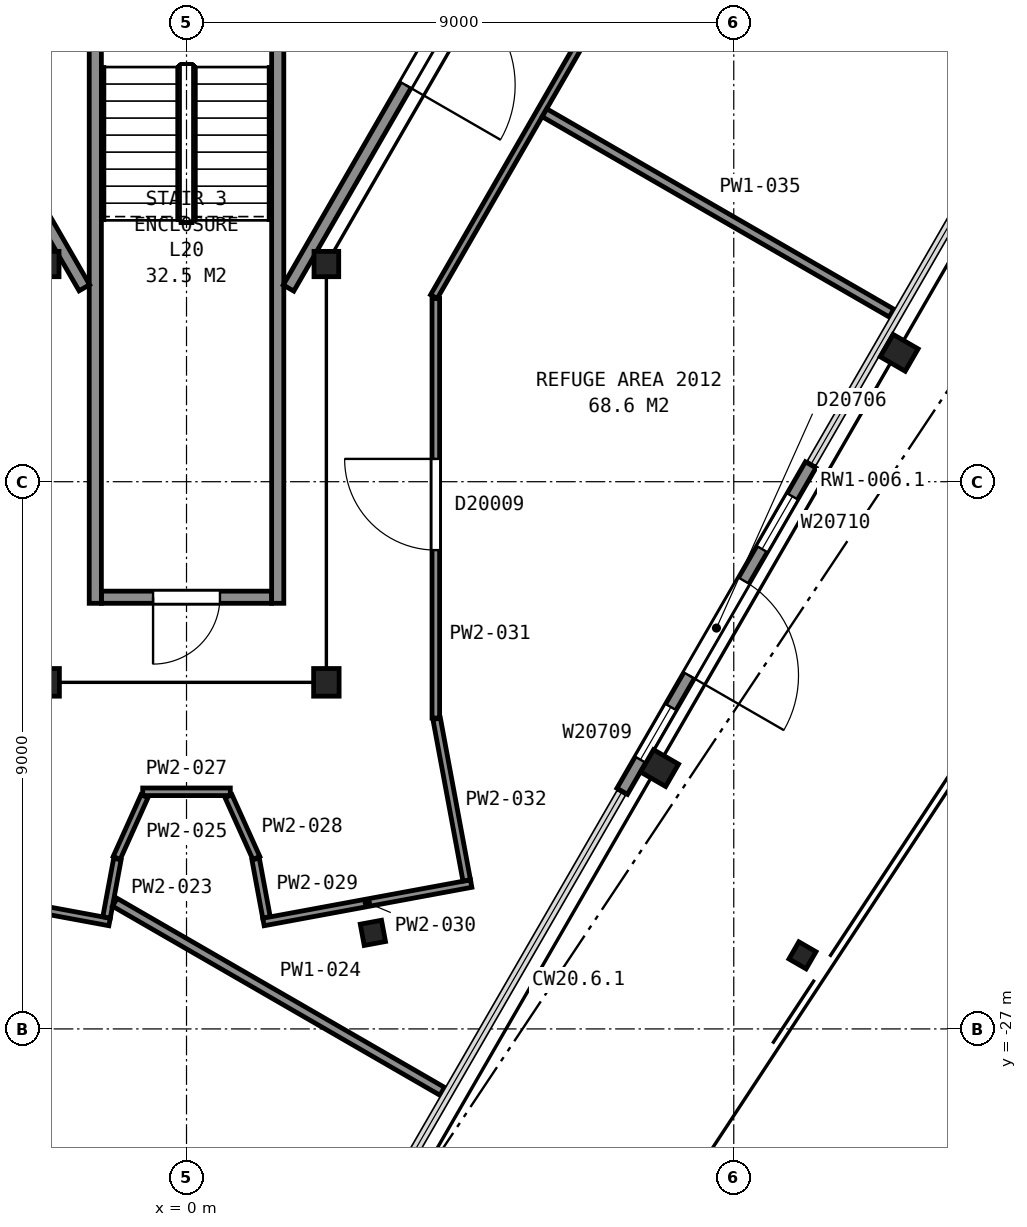
"""IFC4 building model, lengths in metres.
Left out: names, types, materials, properties, quantities, classifications, styles, units other than length and angle.
Written with IfcOpenShell. Run it as: python <this file> out.ifc"""

import sys

from ifc_helpers import new_model, si_unit, direction, frame, frame_2d, origin, origin_2d, place, context, subcontext, project, spatial, rectangle, hollow_rectangle, hollow_circle, i_section, extrude, element, fill, save


model = new_model("IFC4")
c1 = context("Model", 3, precision=1e-05, world=origin(), true_north=direction((0.0, 1.0)))
c2 = subcontext(c1, "Body", "Model", "MODEL_VIEW")
j1 = project(units=[si_unit("LENGTHUNIT", "METRE"), si_unit("PLANEANGLEUNIT", "RADIAN")], contexts=[c1])
p1 = place(None, origin())
s1 = spatial("IfcSite", under=j1, at=p1, CompositionType="ELEMENT")
p2 = place(p1, origin())
s2 = spatial("IfcBuilding", under=s1, at=p2, CompositionType="ELEMENT")
p3 = place(p2, frame((0.0, 0.0, 87.2)))
s3 = spatial("IfcBuildingStorey", under=s2, at=p3, CompositionType="ELEMENT", Elevation=87.2)
for number, where, z_axis, x_axis in (
    (1, (7.78, -22.71, -0.16), (0.0, 0.0, 1.0), (-0.5, -0.866, 0.0)),
    (2, (11.72, -15.88, -0.16), (0.0, 0.0, 1.0), (-0.5, -0.866, 0.0)),
):
    element("IfcColumn", number, at=place(p3, frame(where, z_axis=z_axis, x_axis=x_axis)), inside=s3, PredefinedType="COLUMN", context=c2, shape_type="SweptSolid", body=[
        extrude(i_section(OverallWidth=0.424, OverallDepth=0.475, WebThickness=0.048, FlangeThickness=0.077, FilletRadius=0.015, at=origin_2d()), origin(), (0.0, 0.0, 1.0), 5.76),
    ])
p4 = place(p3, frame((-2.3, -14.42, 0.0), z_axis=(0.0, 0.0, 1.0), x_axis=(1.0, 0.0, 0.0)))
e3 = element("IfcColumn", 3, at=p4, inside=s3, PredefinedType="COLUMN", context=c2, shape_type="SweptSolid", body=[
    extrude(i_section(OverallWidth=0.406, OverallDepth=0.417, WebThickness=0.03, FlangeThickness=0.048, FilletRadius=0.015, at=origin_2d()), origin(), (0.0, 0.0, 1.0), 5.6),
])
for number, where, z_axis, x_axis in (
    (4, (-2.3, -21.3, 0.0), (0.0, 0.0, 1.0), (-1.0, 0.0, 0.0)),
    (5, (2.3, -21.3, 0.0), (0.0, 0.0, 1.0), (-1.0, 0.0, 0.0)),
):
    element("IfcColumn", number, at=place(p3, frame(where, z_axis=z_axis, x_axis=x_axis)), inside=s3, PredefinedType="COLUMN", context=c2, shape_type="SweptSolid", body=[
        extrude(i_section(OverallWidth=0.419, OverallDepth=0.455, WebThickness=0.042, FlangeThickness=0.068, FilletRadius=0.015, at=origin_2d()), origin(), (0.0, 0.0, 1.0), 5.6),
    ])
p5 = place(p3, frame((2.3, -14.42, 0.0), z_axis=(0.0, 0.0, 1.0), x_axis=(1.0, 0.0, 0.0)))
e6 = element("IfcColumn", 6, at=p5, inside=s3, PredefinedType="COLUMN", context=c2, shape_type="SweptSolid", body=[
    extrude(i_section(OverallWidth=0.406, OverallDepth=0.417, WebThickness=0.03, FlangeThickness=0.048, FilletRadius=0.015, at=origin_2d()), origin(), (0.0, 0.0, 1.0), 5.6),
])
p6 = place(p3, frame((10.13, -25.79, -0.73), z_axis=(0.0, 0.0, 1.0), x_axis=(-0.5, -0.866025403784, 0.0)))
e7 = element("IfcColumn", 7, at=p6, inside=s3, PredefinedType="COLUMN", context=c2, shape_type="SweptSolid", body=[
    extrude(hollow_circle(Radius=0.163, WallThickness=0.013, at=origin_2d()), origin(), (0.0, 0.0, 1.0), 5.17),
])
p7 = place(p3, frame((3.065, -25.42, -0.16), z_axis=(0.0, 0.0, 1.0), x_axis=(0.983194740542, 0.182559859143, 0.0)))
e8 = element("IfcColumn", 8, at=p7, inside=s3, PredefinedType="COLUMN", context=c2, shape_type="SweptSolid", body=[
    extrude(hollow_rectangle(XDim=0.356, YDim=0.356, WallThickness=0.013, InnerFilletRadius=0.006, OuterFilletRadius=0.019, at=origin_2d()), origin(), (0.0, 0.0, 1.0), 5.6),
])
p8 = place(p3, frame((7.165, -23.092, 0.0), z_axis=(0.0, 0.0, 1.0), x_axis=(0.500009909098, 0.866019682689, 0.0)))
e9 = element("IfcWall", 9, at=p8, inside=s3, PredefinedType="SOLIDWALL", context=c2, shape_type="SweptSolid", body=[
    extrude(rectangle(XDim=6.2, YDim=0.2, at=frame_2d((3.1, 0.0))), origin(), (0.0, 0.0, 1.0), 4.323),
])
p9 = place(p8, frame((0.6, 0.0, 0.9)))
e10 = element("IfcOpeningElement", 10, at=p9, cuts=e9, PredefinedType="OPENING", context=c2, shape_type="SweptSolid", body=[
    extrude(rectangle(XDim=1.0, YDim=1.5, at=frame_2d((0.5, 0.75))), frame((0.0, 0.11, 0.0), z_axis=(0.0, -1.0, 0.0), x_axis=(1.0, 0.0, 0.0)), (0.0, 0.0, 1.0), 0.22),
])
p10 = place(p8, frame((2.2, 0.0, 0.0)))
e11 = element("IfcOpeningElement", 11, at=p10, cuts=e9, PredefinedType="OPENING", context=c2, shape_type="SweptSolid", body=[
    extrude(rectangle(XDim=1.8, YDim=2.4, at=frame_2d((0.9, 1.2))), frame((0.0, 0.11, 0.0), z_axis=(0.0, -1.0, 0.0), x_axis=(1.0, 0.0, 0.0)), (0.0, 0.0, 1.0), 0.22),
])
p11 = place(p8, frame((4.6, 0.0, 0.9)))
e12 = element("IfcOpeningElement", 12, at=p11, cuts=e9, PredefinedType="OPENING", context=c2, shape_type="SweptSolid", body=[
    extrude(rectangle(XDim=1.0, YDim=1.5, at=frame_2d((0.5, 0.75))), frame((0.0, 0.11, 0.0), z_axis=(0.0, -1.0, 0.0), x_axis=(1.0, 0.0, 0.0)), (0.0, 0.0, 1.0), 0.22),
])
p12 = place(p3, frame((-1.4, -19.9, 0.0), z_axis=(0.0, 0.0, 1.0), x_axis=(1.0, 0.0, 0.0)))
e13 = element("IfcWall", 13, at=p12, inside=s3, PredefinedType="PARTITIONING", context=c2, shape_type="SweptSolid", body=[
    extrude(rectangle(XDim=2.8, YDim=0.2, at=frame_2d((1.4, 0.0))), origin(), (0.0, 0.0, 1.0), 5.35),
])
p13 = place(p12, frame((0.85, 0.0, 0.0)))
e14 = element("IfcOpeningElement", 14, at=p13, cuts=e13, PredefinedType="OPENING", context=c2, shape_type="SweptSolid", body=[
    extrude(rectangle(XDim=1.1, YDim=2.1, at=frame_2d((0.55, 1.05))), frame((0.0, 0.11, 0.0), z_axis=(0.0, -1.0, 0.0), x_axis=(1.0, 0.0, 0.0)), (0.0, 0.0, 1.0), 0.22),
])
for number, where, z_axis, x_axis in (
    (15, (1.5, -8.0, 0.0), (0.0, 0.0, 1.0), (0.0, -1.0, 0.0)),
    (16, (-1.5, -8.0, 0.0), (0.0, 0.0, 1.0), (0.0, -1.0, 0.0)),
):
    element("IfcWall", number, at=place(p3, frame(where, z_axis=z_axis, x_axis=x_axis)), inside=s3, PredefinedType="PARTITIONING", context=c2, shape_type="SweptSolid", body=[
        extrude(rectangle(XDim=12.0, YDim=0.2, at=frame_2d((6.0, 0.0))), origin(), (0.0, 0.0, 1.0), 5.35),
    ])
p14 = place(p3, frame((-13.664, 5.946, 0.0), z_axis=(0.0, 0.0, 1.0), x_axis=(0.499994327219, -0.866028678941, 0.0)))
e17 = element("IfcWall", 17, at=p14, inside=s3, PredefinedType="PARTITIONING", context=c2, shape_type="SweptSolid", body=[
    extrude(rectangle(XDim=23.968, YDim=0.2, at=frame_2d((11.984, 0.0))), origin(), (0.0, 0.0, 1.0), 5.35),
])
p15 = place(p3, frame((1.677, -14.815, 0.0), z_axis=(0.0, 0.0, 1.0), x_axis=(0.49999445743, 0.866028603765, 0.0)))
e18 = element("IfcWall", 18, at=p15, inside=s3, PredefinedType="PARTITIONING", context=c2, shape_type="SweptSolid", body=[
    extrude(rectangle(XDim=5.905, YDim=0.2, at=frame_2d((2.952, 0.0))), origin(), (0.0, 0.0, 1.0), 5.35),
])
p16 = place(p15, frame((3.855, 0.0, 0.0)))
e19 = element("IfcOpeningElement", 19, at=p16, cuts=e18, PredefinedType="OPENING", context=c2, shape_type="SweptSolid", body=[
    extrude(rectangle(XDim=1.8, YDim=2.1, at=frame_2d((0.9, 1.05))), frame((0.0, 0.11, 0.0), z_axis=(0.0, -1.0, 0.0), x_axis=(1.0, 0.0, 0.0)), (0.0, 0.0, 1.0), 0.22),
])
p17 = place(p3, frame((-4.681, -24.61, 0.0), z_axis=(0.0, 0.0, 1.0), x_axis=(0.983318803828, -0.181890434158, 0.0)))
e20 = element("IfcWall", 20, at=p17, inside=s3, PredefinedType="PARTITIONING", context=c2, shape_type="SweptSolid", body=[
    extrude(rectangle(XDim=3.474, YDim=0.125, at=frame_2d((1.737, 0.0))), origin(), (0.0, 0.0, 1.0), 4.262),
])
p18 = place(p3, frame((-1.315, -25.166, 0.0), z_axis=(0.0, 0.0, 1.0), x_axis=(0.182733726002, 0.983162440994, 0.0)))
e21 = element("IfcWall", 21, at=p18, inside=s3, PredefinedType="PARTITIONING", context=c2, shape_type="SweptSolid", body=[
    extrude(rectangle(XDim=0.977, YDim=0.125, at=frame_2d((0.488, 0.0))), origin(), (0.0, 0.0, 1.0), 4.262),
])
p19 = place(p3, frame((-1.18, -24.917, 0.0), z_axis=(0.0, 0.0, 1.0), x_axis=(0.866004486696, -0.50003622771, 0.0)))
e22 = element("IfcWall", 22, at=p19, inside=s3, PredefinedType="PARTITIONING", context=c2, shape_type="SweptSolid", body=[
    extrude(rectangle(XDim=6.219, YDim=0.15, at=frame_2d((3.109, 0.0))), origin(), (0.0, 0.0, 1.0), 4.262),
])
p20 = place(p3, frame((-1.149, -24.189, 0.0), z_axis=(0.0, 0.0, 1.0), x_axis=(0.410747208264, 0.911749269757, 0.0)))
e23 = element("IfcWall", 23, at=p20, inside=s3, PredefinedType="PARTITIONING", context=c2, shape_type="SweptSolid", body=[
    extrude(rectangle(XDim=1.115, YDim=0.125, at=frame_2d((0.557, 0.0))), origin(), (0.0, 0.0, 1.0), 4.262),
])
p21 = place(p3, frame((-0.72, -23.1, 0.0), z_axis=(0.0, 0.0, 1.0), x_axis=(1.0, 0.0, 0.0)))
e24 = element("IfcWall", 24, at=p21, inside=s3, PredefinedType="PARTITIONING", context=c2, shape_type="SweptSolid", body=[
    extrude(rectangle(XDim=1.441, YDim=0.125, at=frame_2d((0.72, 0.0))), origin(), (0.0, 0.0, 1.0), 4.262),
])
p22 = place(p3, frame((0.691, -23.173, 0.0), z_axis=(0.0, 0.0, 1.0), x_axis=(0.410747208264, -0.911749269757, 0.0)))
e25 = element("IfcWall", 25, at=p22, inside=s3, PredefinedType="PARTITIONING", context=c2, shape_type="SweptSolid", body=[
    extrude(rectangle(XDim=1.115, YDim=0.125, at=frame_2d((0.557, 0.0))), origin(), (0.0, 0.0, 1.0), 4.262),
])
p23 = place(p3, frame((1.137, -24.206, 0.0), z_axis=(0.0, 0.0, 1.0), x_axis=(0.182733726002, -0.983162440994, 0.0)))
e26 = element("IfcWall", 26, at=p23, inside=s3, PredefinedType="PARTITIONING", context=c2, shape_type="SweptSolid", body=[
    extrude(rectangle(XDim=0.977, YDim=0.125, at=frame_2d((0.488, 0.0))), origin(), (0.0, 0.0, 1.0), 4.262),
])
p24 = place(p3, frame((1.266, -25.241, 0.0), z_axis=(0.0, 0.0, 1.0), x_axis=(0.983318803828, 0.181890434158, 0.0)))
e27 = element("IfcWall", 27, at=p24, inside=s3, PredefinedType="PARTITIONING", context=c2, shape_type="SweptSolid", body=[
    extrude(rectangle(XDim=3.474, YDim=0.125, at=frame_2d((1.737, 0.0))), origin(), (0.0, 0.0, 1.0), 4.262),
])
p25 = place(p3, frame((4.1, -14.987, 0.0), z_axis=(0.0, 0.0, 1.0), x_axis=(0.0, -1.0, 0.0)))
e28 = element("IfcWall", 28, at=p25, inside=s3, PredefinedType="PARTITIONING", context=c2, shape_type="SweptSolid", body=[
    extrude(rectangle(XDim=6.9, YDim=0.125, at=frame_2d((3.45, 0.0))), origin(), (0.0, 0.0, 1.0), 4.262),
])
p26 = place(p25, frame((2.638, 0.0, 0.0)))
e29 = element("IfcOpeningElement", 29, at=p26, cuts=e28, PredefinedType="OPENING", context=c2, shape_type="SweptSolid", body=[
    extrude(rectangle(XDim=1.5, YDim=2.1, at=frame_2d((0.75, 1.05))), frame((0.0, 0.073, 0.0), z_axis=(0.0, -1.0, 0.0), x_axis=(1.0, 0.0, 0.0)), (0.0, 0.0, 1.0), 0.145),
])
p27 = place(p3, frame((4.114, -21.899, 0.0), z_axis=(0.0, 0.0, 1.0), x_axis=(0.182832825261, -0.983144016921, 0.0)))
e30 = element("IfcWall", 30, at=p27, inside=s3, PredefinedType="PARTITIONING", context=c2, shape_type="SweptSolid", body=[
    extrude(rectangle(XDim=2.704, YDim=0.125, at=frame_2d((1.352, 0.0))), origin(), (0.0, 0.0, 1.0), 4.262),
])
p28 = place(p3, frame((14.979, 3.956, 0.0), z_axis=(0.0, 0.0, 1.0), x_axis=(-0.499707610415, -0.866194149191, 0.0)))
e31 = element("IfcWall", 31, at=p28, inside=s3, PredefinedType="PARTITIONING", context=c2, shape_type="SweptSolid", body=[
    extrude(rectangle(XDim=21.833, YDim=0.125, at=frame_2d((10.917, 0.0))), origin(), (0.0, 0.0, 1.0), 4.262),
])
p29 = place(p28, frame((10.156, 0.0, 0.0)))
e32 = element("IfcOpeningElement", 32, at=p29, cuts=e31, PredefinedType="OPENING", context=c2, shape_type="SweptSolid", body=[
    extrude(rectangle(XDim=1.5, YDim=2.1, at=frame_2d((0.75, 1.05))), frame((0.0, 0.073, 0.0), z_axis=(0.0, -1.0, 0.0), x_axis=(1.0, 0.0, 0.0)), (0.0, 0.0, 1.0), 0.145),
])
p30 = place(p3, frame((5.887, -11.932, 0.0), z_axis=(0.0, 0.0, 1.0), x_axis=(0.866071468634, -0.499920204851, 0.0)))
e33 = element("IfcWall", 33, at=p30, inside=s3, PredefinedType="PARTITIONING", context=c2, shape_type="SweptSolid", body=[
    extrude(rectangle(XDim=6.59, YDim=0.15, at=frame_2d((3.295, 0.0))), origin(), (0.0, 0.0, 1.0), 4.262),
])
p31 = place(p9, origin())
e34 = element("IfcWindow", 34, at=p31, inside=s3, PartitioningType="SINGLE_PANEL", PredefinedType="WINDOW", context=c2, shape_type="SweptSolid", body=[
    extrude(rectangle(XDim=1.0, YDim=1.5, at=frame_2d((0.5, 0.75))), frame((0.0, 0.03, 0.0), z_axis=(0.0, -1.0, 0.0), x_axis=(1.0, 0.0, 0.0)), (0.0, 0.0, 1.0), 0.06),
])
fill(e10, e34)
p32 = place(p10, frame((1.8, 0.0, 0.0), z_axis=(0.0, 0.0, 1.0), x_axis=(-1.0, 0.0, 0.0)))
e35 = element("IfcDoor", 35, at=p32, inside=s3, OperationType="DOUBLE_DOOR_SINGLE_SWING", PredefinedType="DOOR", context=c2, shape_type="SweptSolid", body=[
    extrude(rectangle(XDim=1.8, YDim=2.4, at=frame_2d((0.9, 1.2))), frame((0.0, 0.025, 0.0), z_axis=(0.0, -1.0, 0.0), x_axis=(1.0, 0.0, 0.0)), (0.0, 0.0, 1.0), 0.05),
])
fill(e11, e35)
p33 = place(p11, origin())
e36 = element("IfcWindow", 36, at=p33, inside=s3, PartitioningType="SINGLE_PANEL", PredefinedType="WINDOW", context=c2, shape_type="SweptSolid", body=[
    extrude(rectangle(XDim=1.0, YDim=1.5, at=frame_2d((0.5, 0.75))), frame((0.0, 0.03, 0.0), z_axis=(0.0, -1.0, 0.0), x_axis=(1.0, 0.0, 0.0)), (0.0, 0.0, 1.0), 0.06),
])
fill(e12, e36)
p34 = place(p13, origin())
e37 = element("IfcDoor", 37, at=p34, inside=s3, OperationType="SINGLE_SWING_LEFT", PredefinedType="DOOR", context=c2, shape_type="SweptSolid", body=[
    extrude(rectangle(XDim=1.1, YDim=2.1, at=frame_2d((0.55, 1.05))), frame((0.0, 0.025, 0.0), z_axis=(0.0, -1.0, 0.0), x_axis=(1.0, 0.0, 0.0)), (0.0, 0.0, 1.0), 0.05),
])
fill(e14, e37)
p35 = place(p16, origin())
e38 = element("IfcDoor", 38, at=p35, inside=s3, OperationType="DOUBLE_DOOR_SINGLE_SWING", PredefinedType="DOOR", context=c2, shape_type="SweptSolid", body=[
    extrude(rectangle(XDim=1.8, YDim=2.1, at=frame_2d((0.9, 1.05))), frame((0.0, 0.025, 0.0), z_axis=(0.0, -1.0, 0.0), x_axis=(1.0, 0.0, 0.0)), (0.0, 0.0, 1.0), 0.05),
])
fill(e19, e38)
p36 = place(p26, origin())
e39 = element("IfcDoor", 39, at=p36, inside=s3, OperationType="DOUBLE_DOOR_SINGLE_SWING", PredefinedType="DOOR", context=c2, shape_type="SweptSolid", body=[
    extrude(rectangle(XDim=1.5, YDim=2.1, at=frame_2d((0.75, 1.05))), frame((0.0, 0.025, 0.0), z_axis=(0.0, -1.0, 0.0), x_axis=(1.0, 0.0, 0.0)), (0.0, 0.0, 1.0), 0.05),
])
fill(e29, e39)
save(model, sys.argv[1])
